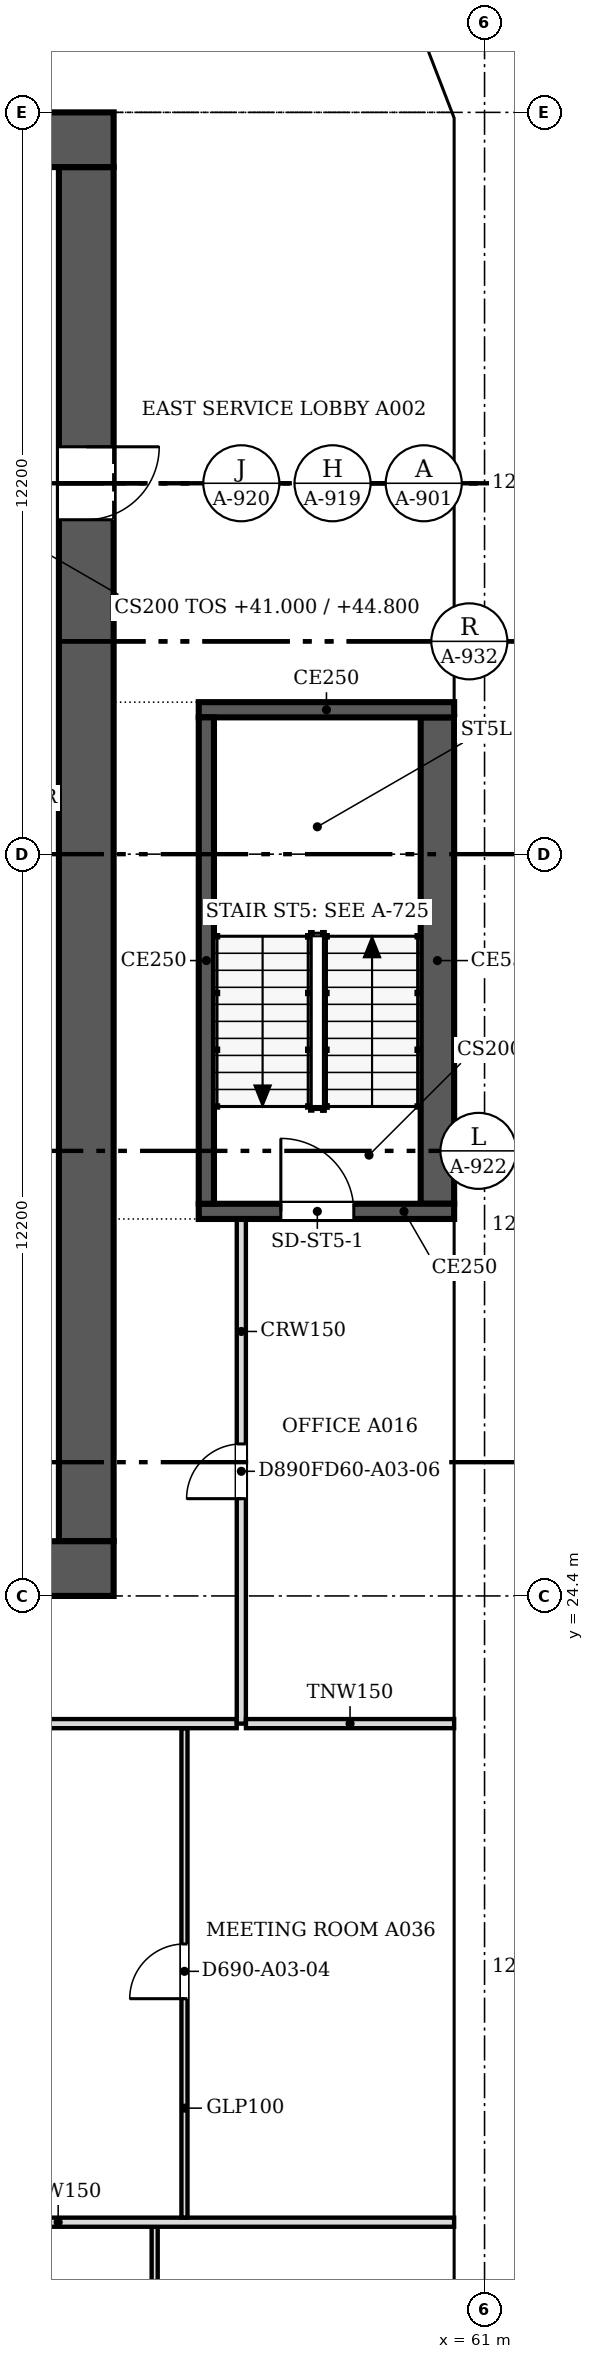
"""IFC4 building model, lengths in metres.
Left out: names, types, materials, properties, quantities, classifications, styles, units other than length and angle.
Written with IfcOpenShell. Run it as: python <this file> out.ifc"""

import sys

from ifc_helpers import new_model, si_unit, direction, frame, frame_2d, origin, place, context, subcontext, project, spatial, polyline, rectangle, outline, extrude, faceted_brep, source, transform, mapped, element, fill, save


model = new_model("IFC4")
c1 = context("Model", 3, precision=1e-05, world=origin(), true_north=direction((0.0, 1.0)))
c2 = subcontext(c1, "Body", "Model", "MODEL_VIEW")
j1 = project(units=[si_unit("LENGTHUNIT", "METRE"), si_unit("PLANEANGLEUNIT", "RADIAN")], contexts=[c1])
p1 = place(None, origin())
s1 = spatial("IfcSite", under=j1, at=p1, CompositionType="ELEMENT")
p2 = place(p1, origin())
s2 = spatial("IfcBuilding", under=s1, at=p2, CompositionType="ELEMENT")
p3 = place(p2, frame((0.0, 0.0, 41.0)))
s3 = spatial("IfcBuildingStorey", under=s2, at=p3, CompositionType="ELEMENT", Elevation=41.0)
m1 = source(origin(), c2, "Body", "SweptSolid", [
    extrude(outline(polyline([(3.05, 0.0), (6.1, 3.8), (3.05, 7.6), (0.0, 3.8), (3.05, 0.0)])), frame((0.0, 0.25, 0.0), z_axis=(0.0, -1.0, 0.0), x_axis=(1.0, 0.0, 0.0)), (0.0, 0.0, 1.0), 0.5),
])
p4 = place(p3, frame((60.75, 12.2, -3.8), z_axis=(0.0, 0.0, 1.0), x_axis=(0.0, 1.0, 0.0)))
e1 = element("IfcWall", 1, at=p4, inside=s3, PredefinedType="SOLIDWALL", context=c2, shape_type="MappedRepresentation", body=[
    mapped(m1, transform((0.0, 0.0, 0.0), scale=1.0)),
])
m2 = source(origin(), c2, "Body", "SweptSolid", [
    extrude(outline(polyline([(3.05, 0.399), (5.78, 3.8), (3.05, 7.201), (0.321, 3.8), (3.05, 0.399)])), frame((0.0, 0.26, 0.0), z_axis=(0.0, -1.0, 0.0), x_axis=(1.0, 0.0, 0.0)), (0.0, 0.0, 1.0), 0.52),
])
p5 = place(p4, origin())
e2 = element("IfcOpeningElement", 2, at=p5, cuts=e1, PredefinedType="OPENING", context=c2, shape_type="MappedRepresentation", body=[
    mapped(m2, transform((0.0, 0.0, 0.0), scale=1.0)),
])
m3 = source(origin(), c2, "Body", "Brep", [
    faceted_brep([(3.05, -0.25, 0.0), (6.1, -0.25, 3.8), (6.1, -0.25, 3.8), (3.05, -0.25, 7.6), (0.0, -0.25, 3.8), (0.0, 0.25, 3.8), (3.05, 0.25, 7.6), (6.1, 0.25, 3.8), (6.1, 0.25, 3.8), (3.05, 0.25, 0.0)], [[[0, 1, 2, 3, 4]], [[5, 6, 7, 8, 9]], [[9, 8, 1, 0]], [[7, 6, 3, 2]], [[6, 5, 4, 3]], [[5, 9, 0, 4]], [[1, 8, 7, 2]]]),
])
p6 = place(p3, frame((60.75, 18.3, -3.8), z_axis=(0.0, 0.0, 1.0), x_axis=(0.0, 1.0, 0.0)))
e3 = element("IfcWall", 3, at=p6, inside=s3, PredefinedType="SOLIDWALL", context=c2, shape_type="MappedRepresentation", body=[
    mapped(m3, transform((0.0, 0.0, 0.0), scale=1.0)),
])
p7 = place(p6, origin())
e4 = element("IfcOpeningElement", 4, at=p7, cuts=e3, PredefinedType="OPENING", context=c2, shape_type="MappedRepresentation", body=[
    mapped(m2, transform((0.0, 0.0, 0.0), scale=1.0)),
])
p8 = place(p3, frame((60.75, 24.4, -3.8), z_axis=(0.0, 0.0, 1.0), x_axis=(0.0, 1.0, 0.0)))
e5 = element("IfcWall", 5, at=p8, inside=s3, PredefinedType="SOLIDWALL", context=c2, shape_type="MappedRepresentation", body=[
    mapped(m1, transform((0.0, 0.0, 0.0), scale=1.0)),
])
p9 = place(p8, origin())
e6 = element("IfcOpeningElement", 6, at=p9, cuts=e5, PredefinedType="OPENING", context=c2, shape_type="MappedRepresentation", body=[
    mapped(m2, transform((0.0, 0.0, 0.0), scale=1.0)),
])
p10 = place(p3, frame((60.75, 30.5, -3.8), z_axis=(0.0, 0.0, 1.0), x_axis=(0.0, 1.0, 0.0)))
e7 = element("IfcWall", 7, at=p10, inside=s3, PredefinedType="SOLIDWALL", context=c2, shape_type="MappedRepresentation", body=[
    mapped(m1, transform((0.0, 0.0, 0.0), scale=1.0)),
])
p11 = place(p10, origin())
e8 = element("IfcOpeningElement", 8, at=p11, cuts=e7, PredefinedType="OPENING", context=c2, shape_type="MappedRepresentation", body=[
    mapped(m2, transform((0.0, 0.0, 0.0), scale=1.0)),
])
p12 = place(p3, frame((60.75, 36.6, -3.8), z_axis=(0.0, 0.0, 1.0), x_axis=(0.0, 1.0, 0.0)))
e9 = element("IfcWall", 9, at=p12, inside=s3, PredefinedType="SOLIDWALL", context=c2, shape_type="MappedRepresentation", body=[
    mapped(m3, transform((0.0, 0.0, 0.0), scale=1.0)),
])
p13 = place(p12, origin())
e10 = element("IfcOpeningElement", 10, at=p13, cuts=e9, PredefinedType="OPENING", context=c2, shape_type="MappedRepresentation", body=[
    mapped(m2, transform((0.0, 0.0, 0.0), scale=1.0)),
])
m4 = source(origin(), c2, "Body", "Brep", [
    faceted_brep([(3.05, -0.25, 0.0), (6.053, -0.25, 3.8), (3.05, -0.25, 7.6), (0.0, -0.25, 3.8), (0.0, 0.25, 3.8), (3.05, 0.25, 7.6), (6.007, 0.25, 3.859), (6.007, 0.25, 3.741), (3.05, 0.25, 0.0), (6.053, 0.0, 3.8)], [[[0, 1, 2, 3]], [[4, 5, 6, 7, 8]], [[8, 7, 9, 1, 0]], [[6, 5, 2, 1, 9]], [[5, 4, 3, 2]], [[4, 8, 0, 3]], [[9, 7, 6]]]),
])
p14 = place(p3, frame((60.75, 42.7, -3.8), z_axis=(0.0, 0.0, 1.0), x_axis=(0.0, 1.0, 0.0)))
e11 = element("IfcWall", 11, at=p14, inside=s3, PredefinedType="SOLIDWALL", context=c2, shape_type="MappedRepresentation", body=[
    mapped(m4, transform((0.0, 0.0, 0.0), scale=1.0)),
])
m5 = source(origin(), c2, "Body", "SweptSolid", [
    extrude(outline(polyline([(3.049, 0.401), (5.735, 3.8), (3.049, 7.199), (0.321, 3.8), (3.049, 0.401)])), frame((0.0, 0.26, 0.0), z_axis=(0.0, -1.0, 0.0), x_axis=(1.0, 0.0, 0.0)), (0.0, 0.0, 1.0), 0.52),
])
p15 = place(p14, origin())
e12 = element("IfcOpeningElement", 12, at=p15, cuts=e11, PredefinedType="OPENING", context=c2, shape_type="MappedRepresentation", body=[
    mapped(m5, transform((0.0, 0.0, 0.0), scale=1.0)),
])
m6 = source(origin(), c2, "Body", "Brep", [
    faceted_brep([(2.95, -0.25, 0.0), (3.003, -0.25, 0.068), (3.003, -0.25, 7.532), (2.95, -0.25, 7.6), (0.0, -0.25, 3.8), (0.047, 0.25, 3.86), (2.898, 0.25, 7.532), (2.898, 0.25, 0.068), (0.047, 0.25, 3.74), (2.95, 0.0, 0.0), (2.95, 0.0, 7.6), (0.0, 0.0, 3.8)], [[[0, 1, 2, 3, 4]], [[5, 6, 7, 8]], [[1, 0, 9]], [[10, 3, 2]], [[6, 5, 11, 4, 3, 10]], [[8, 7, 9, 0, 4, 11]], [[8, 11, 5]], [[1, 9, 7, 6, 10, 2]]]),
])
p16 = place(p3, frame((60.75, 48.753, -3.8), z_axis=(0.0, 0.0, 1.0), x_axis=(-0.35992665181, 0.932980602862, 0.0)))
e13 = element("IfcWall", 13, at=p16, inside=s3, PredefinedType="SOLIDWALL", context=c2, shape_type="MappedRepresentation", body=[
    mapped(m6, transform((0.0, 0.0, 0.0), scale=1.0)),
])
m7 = source(origin(), c2, "Body", "SweptSolid", [
    extrude(outline(polyline([(2.75, 6.935), (0.316, 3.8), (2.75, 0.665), (2.75, 6.935)])), frame((0.0, 0.26, 0.0), z_axis=(0.0, -1.0, 0.0), x_axis=(1.0, 0.0, 0.0)), (0.0, 0.0, 1.0), 0.52),
])
p17 = place(p16, origin())
e14 = element("IfcOpeningElement", 14, at=p17, cuts=e13, PredefinedType="OPENING", context=c2, shape_type="MappedRepresentation", body=[
    mapped(m7, transform((0.0, 0.0, 0.0), scale=1.0)),
])
p18 = place(p2, frame((0.0, 0.0, 44.8)))
s4 = spatial("IfcBuildingStorey", under=s2, at=p18, CompositionType="ELEMENT", Elevation=44.8)
p19 = place(p18, frame((60.75, 9.15, -3.8), z_axis=(0.0, 0.0, 1.0), x_axis=(0.0, 1.0, 0.0)))
e15 = element("IfcWall", 15, at=p19, inside=s4, PredefinedType="SOLIDWALL", context=c2, shape_type="MappedRepresentation", body=[
    mapped(m1, transform((0.0, 0.0, 0.0), scale=1.0)),
])
p20 = place(p19, origin())
e16 = element("IfcOpeningElement", 16, at=p20, cuts=e15, PredefinedType="OPENING", context=c2, shape_type="MappedRepresentation", body=[
    mapped(m2, transform((0.0, 0.0, 0.0), scale=1.0)),
])
p21 = place(p18, frame((60.75, 15.25, -3.8), z_axis=(0.0, 0.0, 1.0), x_axis=(0.0, 1.0, 0.0)))
e17 = element("IfcWall", 17, at=p21, inside=s4, PredefinedType="SOLIDWALL", context=c2, shape_type="MappedRepresentation", body=[
    mapped(m1, transform((0.0, 0.0, 0.0), scale=1.0)),
])
p22 = place(p21, origin())
e18 = element("IfcOpeningElement", 18, at=p22, cuts=e17, PredefinedType="OPENING", context=c2, shape_type="MappedRepresentation", body=[
    mapped(m2, transform((0.0, 0.0, 0.0), scale=1.0)),
])
p23 = place(p18, frame((60.75, 21.35, -3.8), z_axis=(0.0, 0.0, 1.0), x_axis=(0.0, 1.0, 0.0)))
e19 = element("IfcWall", 19, at=p23, inside=s4, PredefinedType="SOLIDWALL", context=c2, shape_type="MappedRepresentation", body=[
    mapped(m3, transform((0.0, 0.0, 0.0), scale=1.0)),
])
p24 = place(p23, origin())
e20 = element("IfcOpeningElement", 20, at=p24, cuts=e19, PredefinedType="OPENING", context=c2, shape_type="MappedRepresentation", body=[
    mapped(m2, transform((0.0, 0.0, 0.0), scale=1.0)),
])
p25 = place(p18, frame((60.75, 27.45, -3.8), z_axis=(0.0, 0.0, 1.0), x_axis=(0.0, 1.0, 0.0)))
e21 = element("IfcWall", 21, at=p25, inside=s4, PredefinedType="SOLIDWALL", context=c2, shape_type="MappedRepresentation", body=[
    mapped(m1, transform((0.0, 0.0, 0.0), scale=1.0)),
])
p26 = place(p25, origin())
e22 = element("IfcOpeningElement", 22, at=p26, cuts=e21, PredefinedType="OPENING", context=c2, shape_type="MappedRepresentation", body=[
    mapped(m2, transform((0.0, 0.0, 0.0), scale=1.0)),
])
p27 = place(p18, frame((60.75, 33.55, -3.8), z_axis=(0.0, 0.0, 1.0), x_axis=(0.0, 1.0, 0.0)))
e23 = element("IfcWall", 23, at=p27, inside=s4, PredefinedType="SOLIDWALL", context=c2, shape_type="MappedRepresentation", body=[
    mapped(m3, transform((0.0, 0.0, 0.0), scale=1.0)),
])
p28 = place(p27, origin())
e24 = element("IfcOpeningElement", 24, at=p28, cuts=e23, PredefinedType="OPENING", context=c2, shape_type="MappedRepresentation", body=[
    mapped(m2, transform((0.0, 0.0, 0.0), scale=1.0)),
])
p29 = place(p18, frame((60.75, 39.65, -3.8), z_axis=(0.0, 0.0, 1.0), x_axis=(0.0, 1.0, 0.0)))
e25 = element("IfcWall", 25, at=p29, inside=s4, PredefinedType="SOLIDWALL", context=c2, shape_type="MappedRepresentation", body=[
    mapped(m1, transform((0.0, 0.0, 0.0), scale=1.0)),
])
p30 = place(p29, origin())
e26 = element("IfcOpeningElement", 26, at=p30, cuts=e25, PredefinedType="OPENING", context=c2, shape_type="MappedRepresentation", body=[
    mapped(m2, transform((0.0, 0.0, 0.0), scale=1.0)),
])
m8 = source(origin(), c2, "Body", "Brep", [
    faceted_brep([(3.003, -0.25, 0.0), (3.05, -0.25, 0.06), (3.05, -0.25, 7.54), (3.003, -0.25, 7.6), (0.0, -0.25, 3.8), (0.0, 0.25, 3.8), (2.957, 0.25, 7.541), (2.957, 0.25, 0.059), (3.003, 0.0, 0.0), (3.003, 0.0, 7.6)], [[[0, 1, 2, 3, 4]], [[5, 6, 7]], [[1, 0, 8]], [[9, 3, 2]], [[6, 5, 4, 3, 9]], [[5, 7, 8, 0, 4]], [[1, 8, 7, 6, 9, 2]]]),
])
p31 = place(p18, frame((60.75, 45.75, -3.8), z_axis=(0.0, 0.0, 1.0), x_axis=(0.0, 1.0, 0.0)))
e27 = element("IfcWall", 27, at=p31, inside=s4, PredefinedType="SOLIDWALL", context=c2, shape_type="MappedRepresentation", body=[
    mapped(m8, transform((0.0, 0.0, 0.0), scale=1.0)),
])
m9 = source(origin(), c2, "Body", "SweptSolid", [
    extrude(outline(polyline([(2.803, 6.944), (0.319, 3.8), (2.803, 0.656), (2.803, 6.944)])), frame((0.0, 0.26, 0.0), z_axis=(0.0, -1.0, 0.0), x_axis=(1.0, 0.0, 0.0)), (0.0, 0.0, 1.0), 0.52),
])
p32 = place(p31, origin())
e28 = element("IfcOpeningElement", 28, at=p32, cuts=e27, PredefinedType="OPENING", context=c2, shape_type="MappedRepresentation", body=[
    mapped(m9, transform((0.0, 0.0, 0.0), scale=1.0)),
])
m10 = source(origin(), c2, "Body", "Brep", [
    faceted_brep([(0.047, -0.25, 0.0), (2.997, -0.25, 3.8), (0.047, -0.25, 7.6), (0.0, -0.25, 7.541), (0.0, -0.25, 0.059), (0.093, 0.25, 7.54), (2.944, 0.25, 3.868), (2.944, 0.25, 3.732), (0.093, 0.25, 0.06), (2.997, 0.0, 3.8), (0.047, 0.0, 0.0), (0.047, 0.0, 7.6)], [[[0, 1, 2, 3, 4]], [[5, 6, 7, 8]], [[8, 7, 9, 1, 0, 10]], [[6, 5, 11, 2, 1, 9]], [[3, 2, 11]], [[10, 0, 4]], [[8, 10, 4, 3, 11, 5]], [[9, 7, 6]]]),
])
p33 = place(p18, frame((60.767, 48.71, -3.8), z_axis=(0.0, 0.0, 1.0), x_axis=(-0.359901446078, 0.932990326376, 0.0)))
e29 = element("IfcWall", 29, at=p33, inside=s4, PredefinedType="SOLIDWALL", context=c2, shape_type="MappedRepresentation", body=[
    mapped(m10, transform((0.0, 0.0, 0.0), scale=1.0)),
])
m11 = source(origin(), c2, "Body", "SweptSolid", [
    extrude(outline(polyline([(0.247, 0.665), (2.681, 3.8), (0.247, 6.935), (0.247, 0.665)])), frame((0.0, 0.26, 0.0), z_axis=(0.0, -1.0, 0.0), x_axis=(1.0, 0.0, 0.0)), (0.0, 0.0, 1.0), 0.52),
])
p34 = place(p33, origin())
e30 = element("IfcOpeningElement", 30, at=p34, cuts=e29, PredefinedType="OPENING", context=c2, shape_type="MappedRepresentation", body=[
    mapped(m11, transform((0.0, 0.0, 0.0), scale=1.0)),
])
p35 = place(p3, frame((54.9, 24.85, 0.0), z_axis=(0.0, 0.0, 1.0), x_axis=(-1.0, 0.0, 0.0)))
e31 = element("IfcWall", 31, at=p35, inside=s3, PredefinedType="SHEAR", context=c2, shape_type="SweptSolid", body=[
    extrude(rectangle(XDim=24.4, YDim=0.9, at=frame_2d((12.2, 0.0))), origin(), (0.0, 0.0, 1.0), 3.8),
])
m12 = source(origin(), c2, "Body", "SweptSolid", [
    extrude(rectangle(XDim=1.2, YDim=2.1, at=frame_2d((0.6, 1.05))), frame((0.0, 0.46, 0.0), z_axis=(0.0, -1.0, 0.0), x_axis=(1.0, 0.0, 0.0)), (0.0, 0.0, 1.0), 0.92),
])
p36 = place(p35, frame((1.5, 0.0, 0.0)))
e32 = element("IfcOpeningElement", 32, at=p36, cuts=e31, PredefinedType="OPENING", context=c2, shape_type="MappedRepresentation", body=[
    mapped(m12, transform((0.0, 0.0, 0.0), scale=1.0)),
])
p37 = place(p3, frame((30.5, 48.35, 0.0), z_axis=(0.0, 0.0, 1.0), x_axis=(1.0, 0.0, 0.0)))
e33 = element("IfcWall", 33, at=p37, inside=s3, PredefinedType="SHEAR", context=c2, shape_type="SweptSolid", body=[
    extrude(rectangle(XDim=24.4, YDim=0.9, at=frame_2d((12.2, 0.0))), origin(), (0.0, 0.0, 1.0), 3.8),
])
p38 = place(p3, frame((54.45, 47.9, 0.0), z_axis=(0.0, 0.0, 1.0), x_axis=(0.0, -1.0, 0.0)))
e34 = element("IfcWall", 34, at=p38, inside=s3, PredefinedType="SHEAR", context=c2, shape_type="SweptSolid", body=[
    extrude(rectangle(XDim=22.6, YDim=0.9, at=frame_2d((11.3, 0.0))), origin(), (0.0, 0.0, 1.0), 3.8),
])
p39 = place(p38, frame((4.6, 0.0, 0.0)))
e35 = element("IfcOpeningElement", 35, at=p39, cuts=e34, PredefinedType="OPENING", context=c2, shape_type="MappedRepresentation", body=[
    mapped(m12, transform((0.0, 0.0, 0.0), scale=1.0)),
])
p40 = place(p3, frame((60.5, 30.725, 0.0), z_axis=(0.0, 0.0, 1.0), x_axis=(-1.0, 0.0, 0.0)))
e36 = element("IfcWall", 36, at=p40, inside=s3, PredefinedType="SOLIDWALL", context=c2, shape_type="SweptSolid", body=[
    extrude(rectangle(XDim=4.2, YDim=0.25, at=frame_2d((2.1, 0.0))), origin(), (0.0, 0.0, 1.0), 3.8),
])
m13 = source(origin(), c2, "Body", "SweptSolid", [
    extrude(rectangle(XDim=1.2, YDim=2.1, at=frame_2d((0.6, 1.05))), frame((0.0, 0.135, 0.0), z_axis=(0.0, -1.0, 0.0), x_axis=(1.0, 0.0, 0.0)), (0.0, 0.0, 1.0), 0.27),
])
p41 = place(p40, frame((1.65, 0.0, 0.0)))
e37 = element("IfcOpeningElement", 37, at=p41, cuts=e36, PredefinedType="OPENING", context=c2, shape_type="MappedRepresentation", body=[
    mapped(m13, transform((0.0, 0.0, 0.0), scale=1.0)),
])
p42 = place(p3, frame((56.425, 30.85, 0.0), z_axis=(0.0, 0.0, 1.0), x_axis=(0.0, 1.0, 0.0)))
e38 = element("IfcWall", 38, at=p42, inside=s3, PredefinedType="SOLIDWALL", context=c2, shape_type="SweptSolid", body=[
    extrude(rectangle(XDim=8.0, YDim=0.25, at=frame_2d((4.0, 0.0))), origin(), (0.0, 0.0, 1.0), 3.8),
])
p43 = place(p3, frame((56.3, 38.975, 0.0), z_axis=(0.0, 0.0, 1.0), x_axis=(1.0, 0.0, 0.0)))
e39 = element("IfcWall", 39, at=p43, inside=s3, PredefinedType="SOLIDWALL", context=c2, shape_type="SweptSolid", body=[
    extrude(rectangle(XDim=4.2, YDim=0.25, at=frame_2d((2.1, 0.0))), origin(), (0.0, 0.0, 1.0), 3.8),
])
p44 = place(p3, frame((60.225, 38.85, 0.0), z_axis=(0.0, 0.0, 1.0), x_axis=(0.0, -1.0, 0.0)))
e40 = element("IfcWall", 40, at=p44, inside=s3, PredefinedType="SOLIDWALL", context=c2, shape_type="SweptSolid", body=[
    extrude(rectangle(XDim=8.0, YDim=0.55, at=frame_2d((4.0, 0.0))), origin(), (0.0, 0.0, 1.0), 3.8),
])
p45 = place(p3, frame((55.575, 14.024, 0.0), z_axis=(0.0, 0.0, 1.0), x_axis=(0.0, -1.0, 0.0)))
e41 = element("IfcWall", 41, at=p45, inside=s3, PredefinedType="PARTITIONING", context=c2, shape_type="SweptSolid", body=[
    extrude(rectangle(XDim=5.924, YDim=0.1, at=frame_2d((2.962, 0.0))), origin(), (0.0, 0.0, 1.0), 3.067),
])
m14 = source(origin(), c2, "Body", "SweptSolid", [
    extrude(rectangle(XDim=0.9, YDim=2.1, at=frame_2d((0.45, 1.05))), frame((0.0, 0.06, 0.0), z_axis=(0.0, -1.0, 0.0), x_axis=(1.0, 0.0, 0.0)), (0.0, 0.0, 1.0), 0.12),
])
p46 = place(p45, frame((2.524, 0.0, 0.0)))
e42 = element("IfcOpeningElement", 42, at=p46, cuts=e41, PredefinedType="OPENING", context=c2, shape_type="MappedRepresentation", body=[
    mapped(m14, transform((0.0, 0.0, 0.0), scale=1.0)),
])
p47 = place(p3, frame((47.476, 14.1, 0.0), z_axis=(0.0, 0.0, 1.0), x_axis=(1.0, 0.0, 0.0)))
e43 = element("IfcWall", 43, at=p47, inside=s3, PredefinedType="PARTITIONING", context=c2, shape_type="SweptSolid", body=[
    extrude(rectangle(XDim=13.024, YDim=0.15, at=frame_2d((6.512, 0.0))), origin(), (0.0, 0.0, 1.0), 3.067),
])
p48 = place(p3, frame((56.065, 22.224, 0.0), z_axis=(0.0, 0.0, 1.0), x_axis=(0.0, -1.0, 0.0)))
e44 = element("IfcWall", 44, at=p48, inside=s3, PredefinedType="PARTITIONING", context=c2, shape_type="SweptSolid", body=[
    extrude(rectangle(XDim=8.048, YDim=0.1, at=frame_2d((4.024, 0.0))), origin(), (0.0, 0.0, 1.0), 3.067),
])
p49 = place(p48, frame((3.548, 0.0, 0.0)))
e45 = element("IfcOpeningElement", 45, at=p49, cuts=e44, PredefinedType="OPENING", context=c2, shape_type="MappedRepresentation", body=[
    mapped(m14, transform((0.0, 0.0, 0.0), scale=1.0)),
])
p50 = place(p3, frame((47.4, 22.3, 0.0), z_axis=(0.0, 0.0, 1.0), x_axis=(1.0, 0.0, 0.0)))
e46 = element("IfcWall", 46, at=p50, inside=s3, PredefinedType="PARTITIONING", context=c2, shape_type="SweptSolid", body=[
    extrude(rectangle(XDim=9.524, YDim=0.15, at=frame_2d((4.762, 0.0))), origin(), (0.0, 0.0, 1.0), 3.067),
])
p51 = place(p3, frame((57.0, 30.6, 0.0), z_axis=(0.0, 0.0, 1.0), x_axis=(0.0, -1.0, 0.0)))
e47 = element("IfcWall", 47, at=p51, inside=s3, PredefinedType="PARTITIONING", context=c2, shape_type="SweptSolid", body=[
    extrude(rectangle(XDim=8.3, YDim=0.15, at=frame_2d((4.15, 0.0))), origin(), (0.0, 0.0, 1.0), 3.067),
])
m15 = source(origin(), c2, "Body", "SweptSolid", [
    extrude(rectangle(XDim=0.9, YDim=2.1, at=frame_2d((0.45, 1.05))), frame((0.0, 0.085, 0.0), z_axis=(0.0, -1.0, 0.0), x_axis=(1.0, 0.0, 0.0)), (0.0, 0.0, 1.0), 0.17),
])
p52 = place(p51, frame((3.7, 0.0, 0.0)))
e48 = element("IfcOpeningElement", 48, at=p52, cuts=e47, PredefinedType="OPENING", context=c2, shape_type="MappedRepresentation", body=[
    mapped(m15, transform((0.0, 0.0, 0.0), scale=1.0)),
])
p53 = place(p3, frame((57.076, 22.3, 0.0), z_axis=(0.0, 0.0, 1.0), x_axis=(1.0, 0.0, 0.0)))
e49 = element("IfcWall", 49, at=p53, inside=s3, PredefinedType="PARTITIONING", context=c2, shape_type="SweptSolid", body=[
    extrude(rectangle(XDim=3.424, YDim=0.15, at=frame_2d((1.712, 0.0))), origin(), (0.0, 0.0, 1.0), 3.067),
])
m16 = source(origin(), c2, "Body", "SweptSolid", [
    extrude(rectangle(XDim=1.2, YDim=2.1, at=frame_2d((0.6, 1.05))), frame((0.0, 0.025, 0.0), z_axis=(0.0, -1.0, 0.0), x_axis=(1.0, 0.0, 0.0)), (0.0, 0.0, 1.0), 0.05),
])
p54 = place(p39, origin())
e50 = element("IfcDoor", 50, at=p54, inside=s3, OperationType="SINGLE_SWING_LEFT", PredefinedType="DOOR", context=c2, shape_type="MappedRepresentation", body=[
    mapped(m16, transform((0.0, 0.0, 0.0), scale=1.0)),
])
fill(e35, e50)
p55 = place(p41, origin())
e51 = element("IfcDoor", 51, at=p55, inside=s3, OperationType="SINGLE_SWING_RIGHT", PredefinedType="DOOR", context=c2, shape_type="MappedRepresentation", body=[
    mapped(m16, transform((0.0, 0.0, 0.0), scale=1.0)),
])
fill(e37, e51)
m17 = source(origin(), c2, "Body", "SweptSolid", [
    extrude(rectangle(XDim=0.9, YDim=2.1, at=frame_2d((0.45, 1.05))), frame((0.0, 0.025, 0.0), z_axis=(0.0, -1.0, 0.0), x_axis=(1.0, 0.0, 0.0)), (0.0, 0.0, 1.0), 0.05),
])
p56 = place(p49, origin())
e52 = element("IfcDoor", 52, at=p56, inside=s3, OperationType="SINGLE_SWING_RIGHT", PredefinedType="DOOR", context=c2, shape_type="MappedRepresentation", body=[
    mapped(m17, transform((0.0, 0.0, 0.0), scale=1.0)),
])
fill(e45, e52)
p57 = place(p52, origin())
e53 = element("IfcDoor", 53, at=p57, inside=s3, OperationType="SINGLE_SWING_RIGHT", PredefinedType="DOOR", context=c2, shape_type="MappedRepresentation", body=[
    mapped(m17, transform((0.0, 0.0, 0.0), scale=1.0)),
])
fill(e48, e53)
save(model, sys.argv[1])
